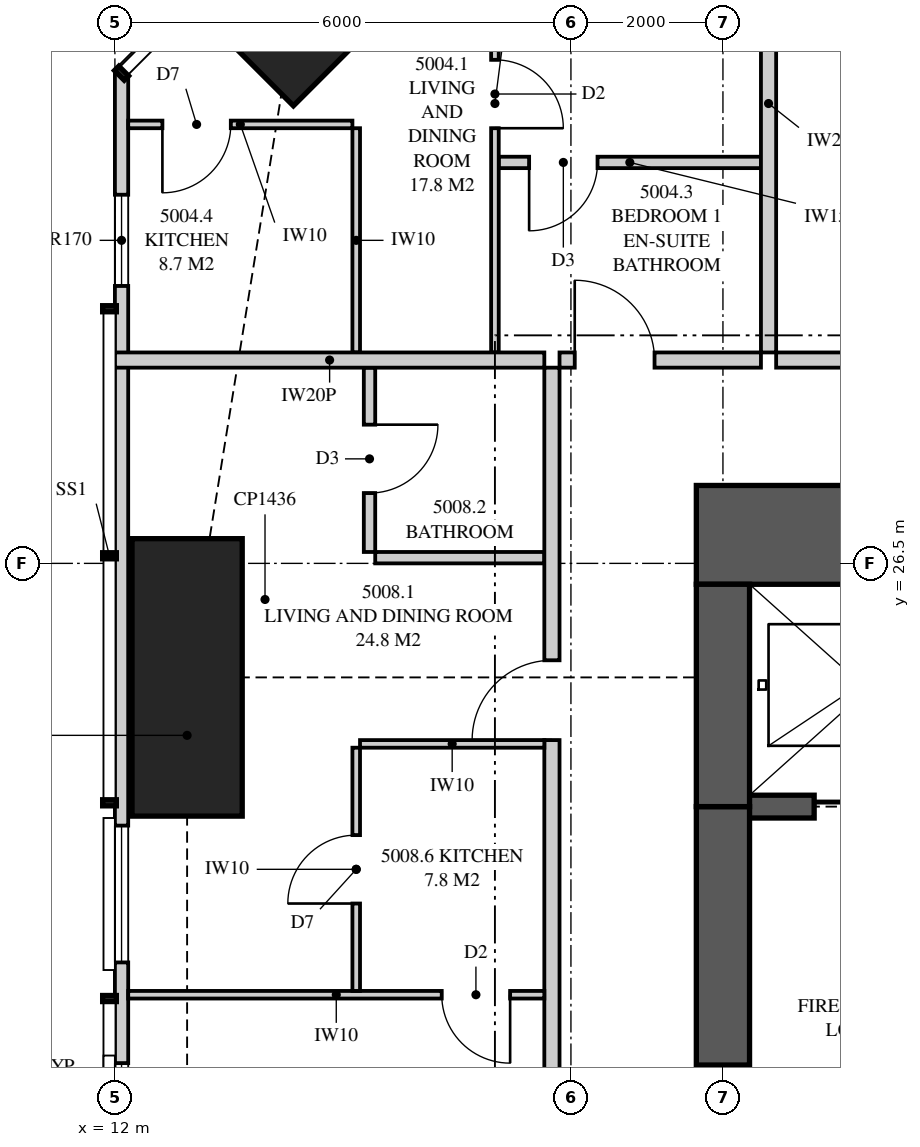
"""IFC4 building model, lengths in metres.
Left out: names, types, materials, properties, quantities, classifications, styles, units other than length and angle.
Written with IfcOpenShell. Run it as: python <this file> out.ifc"""

import sys

from ifc_helpers import new_model, si_unit, direction, frame, frame_2d, origin, origin_2d, place, context, subcontext, project, spatial, polyline, rectangle, outline, extrude, element, fill, save


model = new_model("IFC4")
c1 = context("Model", 3, precision=1e-05, world=origin(), true_north=direction((0.0, 1.0)))
c2 = subcontext(c1, "Body", "Model", "MODEL_VIEW")
j1 = project(units=[si_unit("LENGTHUNIT", "METRE"), si_unit("PLANEANGLEUNIT", "RADIAN")], contexts=[c1])
p1 = place(None, origin())
s1 = spatial("IfcSite", under=j1, at=p1, CompositionType="ELEMENT")
p2 = place(p1, origin())
s2 = spatial("IfcBuilding", under=s1, at=p2, CompositionType="ELEMENT")
p3 = place(p2, frame((0.0, 0.0, 184.5)))
s3 = spatial("IfcBuildingStorey", under=s2, at=p3, CompositionType="ELEMENT", Elevation=184.5)
p4 = place(p3, frame((14.348, 33.652, 0.0), z_axis=(0.0, 0.0, 1.0), x_axis=(0.707106781187, 0.707106781187, 0.0)))
e1 = element("IfcColumn", 1, at=p4, inside=s3, PredefinedType="COLUMN", context=c2, shape_type="SweptSolid", body=[
    extrude(rectangle(XDim=1.6, YDim=1.6, at=origin_2d()), origin(), (0.0, 0.0, 1.0), 3.35),
])
p5 = place(p3, frame((12.95, 25.0, 0.0), z_axis=(0.0, 0.0, 1.0), x_axis=(1.0, 0.0, 0.0)))
e2 = element("IfcColumn", 2, at=p5, inside=s3, PredefinedType="COLUMN", context=c2, shape_type="SweptSolid", body=[
    extrude(rectangle(XDim=1.45, YDim=3.65, at=origin_2d()), origin(), (0.0, 0.0, 1.0), 3.35),
])
p6 = place(p3, frame((26.0, 26.875, 0.0), z_axis=(0.0, 0.0, 1.0), x_axis=(-1.0, 0.0, 0.0)))
e3 = element("IfcWall", 3, at=p6, inside=s3, PredefinedType="SHEAR", context=c2, shape_type="SweptSolid", body=[
    extrude(rectangle(XDim=6.35, YDim=1.3, at=frame_2d((3.175, 0.0))), origin(), (0.0, 0.0, 1.0), 3.35),
])
p7 = place(p6, frame((0.825, 0.0, 0.0)))
e4 = element("IfcOpeningElement", 4, at=p7, cuts=e3, PredefinedType="OPENING", context=c2, shape_type="SweptSolid", body=[
    extrude(rectangle(XDim=0.75, YDim=2.1, at=frame_2d((0.375, 1.05))), frame((0.0, 0.66, 0.0), z_axis=(0.0, -1.0, 0.0), x_axis=(1.0, 0.0, 0.0)), (0.0, 0.0, 1.0), 1.32),
])
p8 = place(p3, frame((20.0, 26.225, 0.0), z_axis=(0.0, 0.0, 1.0), x_axis=(0.0, -1.0, 0.0)))
e5 = element("IfcWall", 5, at=p8, inside=s3, PredefinedType="SHEAR", context=c2, shape_type="SweptSolid", body=[
    extrude(rectangle(XDim=2.925, YDim=0.7, at=frame_2d((1.462, 0.0))), origin(), (0.0, 0.0, 1.0), 3.35),
])
p9 = place(p3, frame((20.0, 23.3, 0.0), z_axis=(0.0, 0.0, 1.0), x_axis=(0.0, -1.0, 0.0)))
e6 = element("IfcWall", 6, at=p9, inside=s3, PredefinedType="SHEAR", context=c2, shape_type="SweptSolid", body=[
    extrude(rectangle(XDim=5.6, YDim=0.7, at=frame_2d((2.8, 0.0))), origin(), (0.0, 0.0, 1.0), 3.35),
])
p10 = place(p9, frame((3.4, 0.0, 0.0)))
e7 = element("IfcOpeningElement", 7, at=p10, cuts=e6, PredefinedType="OPENING", context=c2, shape_type="SweptSolid", body=[
    extrude(rectangle(XDim=1.2, YDim=2.2, at=frame_2d((0.6, 1.1))), frame((0.0, 0.36, 0.0), z_axis=(0.0, -1.0, 0.0), x_axis=(1.0, 0.0, 0.0)), (0.0, 0.0, 1.0), 0.72),
])
p11 = place(p3, frame((20.0, 23.3, 0.0), z_axis=(0.0, 0.0, 1.0), x_axis=(1.0, 0.0, 0.0)))
e8 = element("IfcWall", 8, at=p11, inside=s3, PredefinedType="SHEAR", context=c2, shape_type="SweptSolid", body=[
    extrude(rectangle(XDim=3.6, YDim=0.3, at=frame_2d((1.8, 0.0))), origin(), (0.0, 0.0, 1.0), 3.35),
])
p12 = place(p11, frame((1.2, 0.0, 0.0)))
e9 = element("IfcOpeningElement", 9, at=p12, cuts=e8, PredefinedType="OPENING", context=c2, shape_type="SweptSolid", body=[
    extrude(rectangle(XDim=1.2, YDim=2.1, at=frame_2d((0.6, 1.05))), frame((0.0, 0.16, 0.0), z_axis=(0.0, -1.0, 0.0), x_axis=(1.0, 0.0, 0.0)), (0.0, 0.0, 1.0), 0.32),
])
p13 = place(p3, frame((12.087, 32.949, 0.0), z_axis=(0.0, 0.0, 1.0), x_axis=(0.0, -1.0, 0.0)))
e10 = element("IfcWall", 10, at=p13, inside=s3, PredefinedType="SOLIDWALL", context=c2, shape_type="SweptSolid", body=[
    extrude(outline(polyline([(0.0, 0.0), (29.897, 0.0), (29.897, 3.11), (20.191, 3.11), (20.191, 2.15), (20.051, 2.15), (20.051, 3.11), (19.949, 3.11), (19.949, 2.15), (7.949, 2.15), (7.949, 3.11), (7.823, 3.11), (7.823, 2.15), (7.73, 2.15), (7.73, 3.11), (0.0, 3.11), (0.0, 0.0)])), frame((0.0, 0.087, 0.0), z_axis=(0.0, -1.0, 0.0), x_axis=(1.0, 0.0, 0.0)), (0.0, 0.0, 1.0), 0.175),
])
p14 = place(p13, frame((1.599, 0.0, 0.4)))
e11 = element("IfcOpeningElement", 11, at=p14, cuts=e10, PredefinedType="OPENING", context=c2, shape_type="SweptSolid", body=[
    extrude(rectangle(XDim=1.2, YDim=1.7, at=frame_2d((0.6, 0.85))), frame((0.0, 0.097, 0.0), z_axis=(0.0, -1.0, 0.0), x_axis=(1.0, 0.0, 0.0)), (0.0, 0.0, 1.0), 0.195),
])
p15 = place(p13, frame((9.899, 0.0, 0.4)))
e12 = element("IfcOpeningElement", 12, at=p15, cuts=e10, PredefinedType="OPENING", context=c2, shape_type="SweptSolid", body=[
    extrude(rectangle(XDim=1.8, YDim=1.7, at=frame_2d((0.9, 0.85))), frame((0.0, 0.097, 0.0), z_axis=(0.0, -1.0, 0.0), x_axis=(1.0, 0.0, 0.0)), (0.0, 0.0, 1.0), 0.195),
])
p16 = place(p13, frame((13.024, 0.0, 0.4)))
e13 = element("IfcOpeningElement", 13, at=p16, cuts=e10, PredefinedType="OPENING", context=c2, shape_type="SweptSolid", body=[
    extrude(rectangle(XDim=1.8, YDim=1.7, at=frame_2d((0.9, 0.85))), frame((0.0, 0.097, 0.0), z_axis=(0.0, -1.0, 0.0), x_axis=(1.0, 0.0, 0.0)), (0.0, 0.0, 1.0), 0.195),
])
p17 = place(p13, frame((16.201, 0.0, 0.4)))
e14 = element("IfcOpeningElement", 14, at=p17, cuts=e10, PredefinedType="OPENING", context=c2, shape_type="SweptSolid", body=[
    extrude(rectangle(XDim=1.8, YDim=1.7, at=frame_2d((0.9, 0.85))), frame((0.0, 0.097, 0.0), z_axis=(0.0, -1.0, 0.0), x_axis=(1.0, 0.0, 0.0)), (0.0, 0.0, 1.0), 0.195),
])
p18 = place(p13, frame((22.624, 0.0, 0.0)))
e15 = element("IfcOpeningElement", 15, at=p18, cuts=e10, PredefinedType="OPENING", context=c2, shape_type="SweptSolid", body=[
    extrude(rectangle(XDim=1.8, YDim=2.1, at=frame_2d((0.9, 1.05))), frame((0.0, 0.097, 0.0), z_axis=(0.0, -1.0, 0.0), x_axis=(1.0, 0.0, 0.0)), (0.0, 0.0, 1.0), 0.195),
])
p19 = place(p3, frame((20.6, 35.825, 0.0), z_axis=(0.0, 0.0, 1.0), x_axis=(0.0, -1.0, 0.0)))
e16 = element("IfcWall", 16, at=p19, inside=s3, PredefinedType="PARTITIONING", context=c2, shape_type="SweptSolid", body=[
    extrude(outline(polyline([(0.0, 0.0), (6.55, 0.0), (6.55, 3.11), (1.991, 3.11), (1.991, 2.15), (0.143, 2.15), (0.143, 3.11), (0.0, 3.11), (0.0, 0.0)])), frame((0.0, 0.1, 0.0), z_axis=(0.0, -1.0, 0.0), x_axis=(1.0, 0.0, 0.0)), (0.0, 0.0, 1.0), 0.2),
])
p20 = place(p3, frame((17.85, 29.175, 0.0), z_axis=(0.0, 0.0, 1.0), x_axis=(1.0, 0.0, 0.0)))
e17 = element("IfcWall", 17, at=p20, inside=s3, PredefinedType="PARTITIONING", context=c2, shape_type="SweptSolid", body=[
    extrude(rectangle(XDim=2.65, YDim=0.2, at=frame_2d((1.325, 0.0))), origin(), (0.0, 0.0, 1.0), 3.11),
])
p21 = place(p20, frame((0.2, 0.0, 0.0)))
e18 = element("IfcOpeningElement", 18, at=p21, cuts=e17, PredefinedType="OPENING", context=c2, shape_type="SweptSolid", body=[
    extrude(rectangle(XDim=1.05, YDim=2.2, at=frame_2d((0.525, 1.1))), frame((0.0, 0.11, 0.0), z_axis=(0.0, -1.0, 0.0), x_axis=(1.0, 0.0, 0.0)), (0.0, 0.0, 1.0), 0.22),
])
p22 = place(p3, frame((17.0, 35.825, 0.0), z_axis=(0.0, 0.0, 1.0), x_axis=(0.0, -1.0, 0.0)))
e19 = element("IfcWall", 19, at=p22, inside=s3, PredefinedType="PARTITIONING", context=c2, shape_type="SweptSolid", body=[
    extrude(outline(polyline([(0.0, 0.0), (6.55, 0.0), (6.55, 3.11), (2.578, 3.11), (2.578, 2.15), (0.831, 2.15), (0.831, 3.11), (0.0, 3.11), (0.0, 0.0)])), frame((0.0, 0.05, 0.0), z_axis=(0.0, -1.0, 0.0), x_axis=(1.0, 0.0, 0.0)), (0.0, 0.0, 1.0), 0.1),
])
p23 = place(p22, frame((2.7, 0.0, 0.0)))
e20 = element("IfcOpeningElement", 20, at=p23, cuts=e19, PredefinedType="OPENING", context=c2, shape_type="SweptSolid", body=[
    extrude(rectangle(XDim=0.9, YDim=2.1, at=frame_2d((0.45, 1.05))), frame((0.0, 0.06, 0.0), z_axis=(0.0, -1.0, 0.0), x_axis=(1.0, 0.0, 0.0)), (0.0, 0.0, 1.0), 0.12),
])
p24 = place(p3, frame((17.05, 31.775, 0.0), z_axis=(0.0, 0.0, 1.0), x_axis=(1.0, 0.0, 0.0)))
e21 = element("IfcWall", 21, at=p24, inside=s3, PredefinedType="PLUMBINGWALL", context=c2, shape_type="SweptSolid", body=[
    extrude(rectangle(XDim=3.45, YDim=0.15, at=frame_2d((1.725, 0.0))), origin(), (0.0, 0.0, 1.0), 3.11),
])
p25 = place(p24, frame((0.4, 0.0, 0.0)))
e22 = element("IfcOpeningElement", 22, at=p25, cuts=e21, PredefinedType="OPENING", context=c2, shape_type="SweptSolid", body=[
    extrude(rectangle(XDim=0.9, YDim=2.1, at=frame_2d((0.45, 1.05))), frame((0.0, 0.085, 0.0), z_axis=(0.0, -1.0, 0.0), x_axis=(1.0, 0.0, 0.0)), (0.0, 0.0, 1.0), 0.17),
])
p26 = place(p3, frame((12.175, 32.275, 0.0), z_axis=(0.0, 0.0, 1.0), x_axis=(1.0, 0.0, 0.0)))
e23 = element("IfcWall", 23, at=p26, inside=s3, PredefinedType="PARTITIONING", context=c2, shape_type="SweptSolid", body=[
    extrude(outline(polyline([(0.0, 0.0), (2.95, 0.0), (2.95, 3.11), (2.822, 3.11), (2.822, 2.15), (1.08, 2.15), (1.08, 3.11), (0.0, 3.11), (0.0, 0.0)])), frame((0.0, 0.05, 0.0), z_axis=(0.0, -1.0, 0.0), x_axis=(1.0, 0.0, 0.0)), (0.0, 0.0, 1.0), 0.1),
])
p27 = place(p26, frame((0.45, 0.0, 0.0)))
e24 = element("IfcOpeningElement", 24, at=p27, cuts=e23, PredefinedType="OPENING", context=c2, shape_type="SweptSolid", body=[
    extrude(rectangle(XDim=0.9, YDim=2.1, at=frame_2d((0.45, 1.05))), frame((0.0, 0.06, 0.0), z_axis=(0.0, -1.0, 0.0), x_axis=(1.0, 0.0, 0.0)), (0.0, 0.0, 1.0), 0.12),
])
p28 = place(p3, frame((15.175, 32.225, 0.0), z_axis=(0.0, 0.0, 1.0), x_axis=(0.0, -1.0, 0.0)))
e25 = element("IfcWall", 25, at=p28, inside=s3, PredefinedType="PARTITIONING", context=c2, shape_type="SweptSolid", body=[
    extrude(rectangle(XDim=2.95, YDim=0.1, at=frame_2d((1.475, 0.0))), origin(), (0.0, 0.0, 1.0), 3.11),
])
p29 = place(p3, frame((20.7, 29.175, 0.0), z_axis=(0.0, 0.0, 1.0), x_axis=(1.0, 0.0, 0.0)))
e26 = element("IfcWall", 26, at=p29, inside=s3, PredefinedType="PARTITIONING", context=c2, shape_type="SweptSolid", body=[
    extrude(outline(polyline([(0.0, 0.0), (3.7, 0.0), (3.7, 3.11), (1.887, 3.11), (1.887, 2.541), (1.213, 2.541), (1.213, 3.11), (0.0, 3.11), (0.0, 0.0)])), frame((0.0, 0.1, 0.0), z_axis=(0.0, -1.0, 0.0), x_axis=(1.0, 0.0, 0.0)), (0.0, 0.0, 1.0), 0.2),
])
p30 = place(p3, frame((12.0, 29.175, 0.0), z_axis=(0.0, 0.0, 1.0), x_axis=(1.0, 0.0, 0.0)))
e27 = element("IfcWall", 27, at=p30, inside=s3, PredefinedType="PARTITIONING", context=c2, shape_type="SweptSolid", body=[
    extrude(outline(polyline([(0.0, 0.0), (5.65, 0.0), (5.65, 3.11), (2.547, 3.11), (2.547, 2.15), (0.703, 2.15), (0.703, 3.11), (0.0, 3.11), (0.0, 0.0)])), frame((0.0, 0.1, 0.0), z_axis=(0.0, -1.0, 0.0), x_axis=(1.0, 0.0, 0.0)), (0.0, 0.0, 1.0), 0.2),
])
p31 = place(p3, frame((17.75, 7.925, 0.0), z_axis=(0.0, 0.0, 1.0), x_axis=(0.0, 1.0, 0.0)))
e28 = element("IfcWall", 28, at=p31, inside=s3, PredefinedType="PARTITIONING", context=c2, shape_type="SweptSolid", body=[
    extrude(outline(polyline([(0.0, 0.0), (21.15, 0.0), (21.15, 3.11), (17.412, 3.11), (17.412, 2.541), (16.738, 2.541), (16.738, 3.11), (5.412, 3.11), (5.412, 2.541), (4.738, 2.541), (4.738, 3.11), (0.0, 3.11), (0.0, 0.0)])), frame((0.0, 0.1, 0.0), z_axis=(0.0, -1.0, 0.0), x_axis=(1.0, 0.0, 0.0)), (0.0, 0.0, 1.0), 0.2),
])
p32 = place(p31, frame((16.25, 0.0, 0.0)))
e29 = element("IfcOpeningElement", 29, at=p32, cuts=e28, PredefinedType="OPENING", context=c2, shape_type="SweptSolid", body=[
    extrude(rectangle(XDim=1.05, YDim=2.2, at=frame_2d((0.525, 1.1))), frame((0.0, 0.11, 0.0), z_axis=(0.0, -1.0, 0.0), x_axis=(1.0, 0.0, 0.0)), (0.0, 0.0, 1.0), 0.22),
])
p33 = place(p3, frame((15.35, 26.65, 0.0), z_axis=(0.0, 0.0, 1.0), x_axis=(0.0, 1.0, 0.0)))
e30 = element("IfcWall", 30, at=p33, inside=s3, PredefinedType="PLUMBINGWALL", context=c2, shape_type="SweptSolid", body=[
    extrude(rectangle(XDim=2.425, YDim=0.15, at=frame_2d((1.212, 0.0))), origin(), (0.0, 0.0, 1.0), 3.11),
])
p34 = place(p33, frame((0.775, 0.0, 0.0)))
e31 = element("IfcOpeningElement", 31, at=p34, cuts=e30, PredefinedType="OPENING", context=c2, shape_type="SweptSolid", body=[
    extrude(rectangle(XDim=0.9, YDim=2.1, at=frame_2d((0.45, 1.05))), frame((0.0, 0.085, 0.0), z_axis=(0.0, -1.0, 0.0), x_axis=(1.0, 0.0, 0.0)), (0.0, 0.0, 1.0), 0.17),
])
p35 = place(p3, frame((15.425, 26.575, 0.0), z_axis=(0.0, 0.0, 1.0), x_axis=(1.0, 0.0, 0.0)))
e32 = element("IfcWall", 32, at=p35, inside=s3, PredefinedType="PLUMBINGWALL", context=c2, shape_type="SweptSolid", body=[
    extrude(rectangle(XDim=2.225, YDim=0.15, at=frame_2d((1.112, 0.0))), origin(), (0.0, 0.0, 1.0), 3.11),
])
p36 = place(p3, frame((12.175, 20.825, 0.0), z_axis=(0.0, 0.0, 1.0), x_axis=(1.0, 0.0, 0.0)))
e33 = element("IfcWall", 33, at=p36, inside=s3, PredefinedType="PARTITIONING", context=c2, shape_type="SweptSolid", body=[
    extrude(outline(polyline([(0.0, 0.0), (5.475, 0.0), (5.475, 3.11), (1.635, 3.11), (1.635, 2.15), (0.0, 2.15), (0.0, 3.11), (0.0, 0.0)])), frame((0.0, 0.05, 0.0), z_axis=(0.0, -1.0, 0.0), x_axis=(1.0, 0.0, 0.0)), (0.0, 0.0, 1.0), 0.1),
])
p37 = place(p36, frame((4.125, 0.0, 0.0)))
e34 = element("IfcOpeningElement", 34, at=p37, cuts=e33, PredefinedType="OPENING", context=c2, shape_type="SweptSolid", body=[
    extrude(rectangle(XDim=0.9, YDim=2.1, at=frame_2d((0.45, 1.05))), frame((0.0, 0.06, 0.0), z_axis=(0.0, -1.0, 0.0), x_axis=(1.0, 0.0, 0.0)), (0.0, 0.0, 1.0), 0.12),
])
p38 = place(p3, frame((15.175, 20.875, 0.0), z_axis=(0.0, 0.0, 1.0), x_axis=(0.0, 1.0, 0.0)))
e35 = element("IfcWall", 35, at=p38, inside=s3, PredefinedType="PARTITIONING", context=c2, shape_type="SweptSolid", body=[
    extrude(rectangle(XDim=3.2, YDim=0.1, at=frame_2d((1.6, 0.0))), origin(), (0.0, 0.0, 1.0), 3.11),
])
p39 = place(p38, frame((1.15, 0.0, 0.0)))
e36 = element("IfcOpeningElement", 36, at=p39, cuts=e35, PredefinedType="OPENING", context=c2, shape_type="SweptSolid", body=[
    extrude(rectangle(XDim=0.9, YDim=2.1, at=frame_2d((0.45, 1.05))), frame((0.0, 0.06, 0.0), z_axis=(0.0, -1.0, 0.0), x_axis=(1.0, 0.0, 0.0)), (0.0, 0.0, 1.0), 0.12),
])
p40 = place(p3, frame((15.225, 24.125, 0.0), z_axis=(0.0, 0.0, 1.0), x_axis=(1.0, 0.0, 0.0)))
e37 = element("IfcWall", 37, at=p40, inside=s3, PredefinedType="PARTITIONING", context=c2, shape_type="SweptSolid", body=[
    extrude(rectangle(XDim=2.425, YDim=0.1, at=frame_2d((1.212, 0.0))), origin(), (0.0, 0.0, 1.0), 3.11),
])
p41 = place(p14, origin())
e38 = element("IfcWindow", 38, at=p41, inside=s3, PartitioningType="SINGLE_PANEL", PredefinedType="WINDOW", context=c2, shape_type="SweptSolid", body=[
    extrude(rectangle(XDim=1.2, YDim=1.7, at=frame_2d((0.6, 0.85))), frame((0.0, 0.03, 0.0), z_axis=(0.0, -1.0, 0.0), x_axis=(1.0, 0.0, 0.0)), (0.0, 0.0, 1.0), 0.06),
])
fill(e11, e38)
p42 = place(p15, origin())
e39 = element("IfcWindow", 39, at=p42, inside=s3, PartitioningType="SINGLE_PANEL", PredefinedType="WINDOW", context=c2, shape_type="SweptSolid", body=[
    extrude(rectangle(XDim=1.8, YDim=1.7, at=frame_2d((0.9, 0.85))), frame((0.0, 0.03, 0.0), z_axis=(0.0, -1.0, 0.0), x_axis=(1.0, 0.0, 0.0)), (0.0, 0.0, 1.0), 0.06),
])
fill(e12, e39)
p43 = place(p16, origin())
e40 = element("IfcWindow", 40, at=p43, inside=s3, PartitioningType="SINGLE_PANEL", PredefinedType="WINDOW", context=c2, shape_type="SweptSolid", body=[
    extrude(rectangle(XDim=1.8, YDim=1.7, at=frame_2d((0.9, 0.85))), frame((0.0, 0.03, 0.0), z_axis=(0.0, -1.0, 0.0), x_axis=(1.0, 0.0, 0.0)), (0.0, 0.0, 1.0), 0.06),
])
fill(e13, e40)
p44 = place(p21, origin())
e41 = element("IfcDoor", 41, at=p44, inside=s3, OperationType="SINGLE_SWING_LEFT", PredefinedType="DOOR", context=c2, shape_type="SweptSolid", body=[
    extrude(rectangle(XDim=1.05, YDim=2.2, at=frame_2d((0.525, 1.1))), frame((0.0, 0.025, 0.0), z_axis=(0.0, -1.0, 0.0), x_axis=(1.0, 0.0, 0.0)), (0.0, 0.0, 1.0), 0.05),
])
fill(e18, e41)
p45 = place(p23, origin())
e42 = element("IfcDoor", 42, at=p45, inside=s3, OperationType="SINGLE_SWING_RIGHT", PredefinedType="DOOR", context=c2, shape_type="SweptSolid", body=[
    extrude(rectangle(XDim=0.9, YDim=2.1, at=frame_2d((0.45, 1.05))), frame((0.0, 0.025, 0.0), z_axis=(0.0, -1.0, 0.0), x_axis=(1.0, 0.0, 0.0)), (0.0, 0.0, 1.0), 0.05),
])
fill(e20, e42)
p46 = place(p25, frame((0.9, 0.0, 0.0), z_axis=(0.0, 0.0, 1.0), x_axis=(-1.0, 0.0, 0.0)))
e43 = element("IfcDoor", 43, at=p46, inside=s3, OperationType="SINGLE_SWING_RIGHT", PredefinedType="DOOR", context=c2, shape_type="SweptSolid", body=[
    extrude(rectangle(XDim=0.9, YDim=2.1, at=frame_2d((0.45, 1.05))), frame((0.0, 0.025, 0.0), z_axis=(0.0, -1.0, 0.0), x_axis=(1.0, 0.0, 0.0)), (0.0, 0.0, 1.0), 0.05),
])
fill(e22, e43)
p47 = place(p27, frame((0.9, 0.0, 0.0), z_axis=(0.0, 0.0, 1.0), x_axis=(-1.0, 0.0, 0.0)))
e44 = element("IfcDoor", 44, at=p47, inside=s3, OperationType="SINGLE_SWING_RIGHT", PredefinedType="DOOR", context=c2, shape_type="SweptSolid", body=[
    extrude(rectangle(XDim=0.9, YDim=2.1, at=frame_2d((0.45, 1.05))), frame((0.0, 0.025, 0.0), z_axis=(0.0, -1.0, 0.0), x_axis=(1.0, 0.0, 0.0)), (0.0, 0.0, 1.0), 0.05),
])
fill(e24, e44)
p48 = place(p32, origin())
e45 = element("IfcDoor", 45, at=p48, inside=s3, OperationType="SINGLE_SWING_LEFT", PredefinedType="DOOR", context=c2, shape_type="SweptSolid", body=[
    extrude(rectangle(XDim=1.05, YDim=2.2, at=frame_2d((0.525, 1.1))), frame((0.0, 0.025, 0.0), z_axis=(0.0, -1.0, 0.0), x_axis=(1.0, 0.0, 0.0)), (0.0, 0.0, 1.0), 0.05),
])
fill(e29, e45)
p49 = place(p34, frame((0.9, 0.0, 0.0), z_axis=(0.0, 0.0, 1.0), x_axis=(-1.0, 0.0, 0.0)))
e46 = element("IfcDoor", 46, at=p49, inside=s3, OperationType="SINGLE_SWING_LEFT", PredefinedType="DOOR", context=c2, shape_type="SweptSolid", body=[
    extrude(rectangle(XDim=0.9, YDim=2.1, at=frame_2d((0.45, 1.05))), frame((0.0, 0.025, 0.0), z_axis=(0.0, -1.0, 0.0), x_axis=(1.0, 0.0, 0.0)), (0.0, 0.0, 1.0), 0.05),
])
fill(e31, e46)
p50 = place(p37, frame((0.9, 0.0, 0.0), z_axis=(0.0, 0.0, 1.0), x_axis=(-1.0, 0.0, 0.0)))
e47 = element("IfcDoor", 47, at=p50, inside=s3, OperationType="SINGLE_SWING_LEFT", PredefinedType="DOOR", context=c2, shape_type="SweptSolid", body=[
    extrude(rectangle(XDim=0.9, YDim=2.1, at=frame_2d((0.45, 1.05))), frame((0.0, 0.025, 0.0), z_axis=(0.0, -1.0, 0.0), x_axis=(1.0, 0.0, 0.0)), (0.0, 0.0, 1.0), 0.05),
])
fill(e34, e47)
p51 = place(p39, origin())
e48 = element("IfcDoor", 48, at=p51, inside=s3, OperationType="SINGLE_SWING_LEFT", PredefinedType="DOOR", context=c2, shape_type="SweptSolid", body=[
    extrude(rectangle(XDim=0.9, YDim=2.1, at=frame_2d((0.45, 1.05))), frame((0.0, 0.025, 0.0), z_axis=(0.0, -1.0, 0.0), x_axis=(1.0, 0.0, 0.0)), (0.0, 0.0, 1.0), 0.05),
])
fill(e36, e48)
p52 = place(p10, origin())
e49 = element("IfcDoor", 49, at=p52, inside=s3, OperationType="SINGLE_SWING_RIGHT", PredefinedType="DOOR", context=c2, shape_type="SweptSolid", body=[
    extrude(rectangle(XDim=1.2, YDim=2.2, at=frame_2d((0.6, 1.1))), frame((0.0, 0.025, 0.0), z_axis=(0.0, -1.0, 0.0), x_axis=(1.0, 0.0, 0.0)), (0.0, 0.0, 1.0), 0.05),
])
fill(e7, e49)
p53 = place(p12, origin())
e50 = element("IfcDoor", 50, at=p53, inside=s3, OperationType="SLIDING_TO_LEFT", PredefinedType="DOOR", context=c2, shape_type="SweptSolid", body=[
    extrude(rectangle(XDim=1.2, YDim=2.1, at=frame_2d((0.6, 1.05))), frame((0.0, 0.025, 0.0), z_axis=(0.0, -1.0, 0.0), x_axis=(1.0, 0.0, 0.0)), (0.0, 0.0, 1.0), 0.05),
])
fill(e9, e50)
save(model, sys.argv[1])
